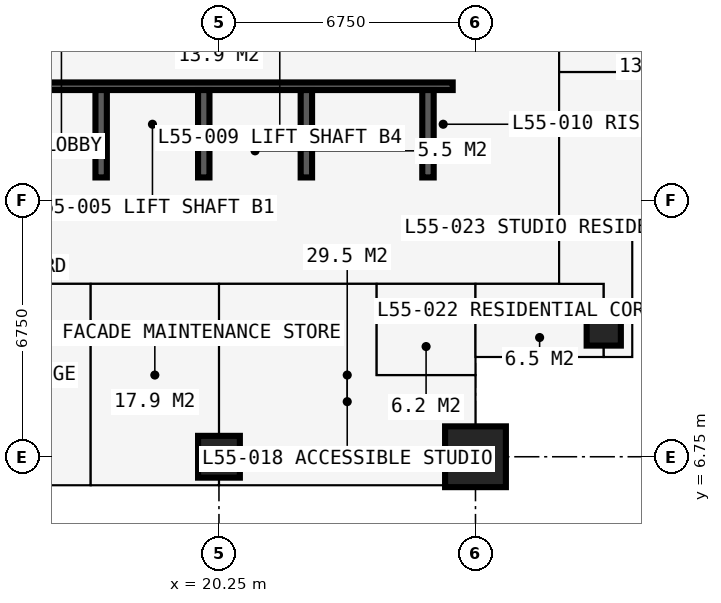
"""IFC4 building model, lengths in metres.
Left out: names, types, materials, properties, quantities, classifications, styles, units other than length and angle.
Written with IfcOpenShell. Run it as: python <this file> out.ifc"""

import sys

from ifc_helpers import new_model, si_unit, direction, frame, frame_2d, origin, origin_2d, place, context, subcontext, project, spatial, rectangle, extrude, element, fill, save


model = new_model("IFC4")
c1 = context("Model", 3, precision=1e-05, world=origin(), true_north=direction((0.0, 1.0)))
c2 = subcontext(c1, "Body", "Model", "MODEL_VIEW")
j1 = project(units=[si_unit("LENGTHUNIT", "METRE"), si_unit("PLANEANGLEUNIT", "RADIAN")], contexts=[c1])
p1 = place(None, origin())
s1 = spatial("IfcSite", under=j1, at=p1, CompositionType="ELEMENT")
p2 = place(p1, origin())
s2 = spatial("IfcBuilding", under=s1, at=p2, CompositionType="ELEMENT")
p3 = place(p2, frame((0.0, 0.0, 204.3)))
s3 = spatial("IfcBuildingStorey", under=s2, at=p3, CompositionType="ELEMENT", Elevation=204.3)
p4 = place(p3, frame((20.25, 6.75, 0.0), z_axis=(0.0, 0.0, 1.0), x_axis=(1.0, 0.0, 0.0)))
e1 = element("IfcColumn", 1, at=p4, inside=s3, PredefinedType="COLUMN", context=c2, shape_type="SweptSolid", body=[
    extrude(rectangle(XDim=1.1, YDim=1.1, at=origin_2d()), origin(), (0.0, 0.0, 1.0), 3.6),
])
p5 = place(p3, frame((27.0, 6.75, 0.0), z_axis=(0.0, 0.0, 1.0), x_axis=(1.0, 0.0, 0.0)))
e2 = element("IfcColumn", 2, at=p5, inside=s3, PredefinedType="COLUMN", context=c2, shape_type="SweptSolid", body=[
    extrude(rectangle(XDim=1.6, YDim=1.6, at=origin_2d()), origin(), (0.0, 0.0, 1.0), 3.6),
])
p6 = place(p3, frame((30.375, 10.125, 0.0), z_axis=(0.0, 0.0, 1.0), x_axis=(1.0, 0.0, 0.0)))
e3 = element("IfcColumn", 3, at=p6, inside=s3, PredefinedType="COLUMN", context=c2, shape_type="SweptSolid", body=[
    extrude(rectangle(XDim=0.9, YDim=0.9, at=origin_2d()), origin(), (0.0, 0.0, 1.0), 3.6),
])
p7 = place(p3, frame((13.2, 13.5, 0.0), z_axis=(0.0, 0.0, 1.0), x_axis=(1.0, 0.0, 0.0)))
e4 = element("IfcWall", 4, at=p7, inside=s3, PredefinedType="SHEAR", context=c2, shape_type="SweptSolid", body=[
    extrude(rectangle(XDim=14.1, YDim=1.2, at=frame_2d((7.05, 0.0))), origin(), (0.0, 0.0, 1.0), 3.6),
])
p8 = place(p3, frame((26.85, 14.1, 0.0), z_axis=(0.0, 0.0, 1.0), x_axis=(0.0, 1.0, 0.0)))
e5 = element("IfcWall", 5, at=p8, inside=s3, PredefinedType="SHEAR", context=c2, shape_type="SweptSolid", body=[
    extrude(rectangle(XDim=12.3, YDim=0.9, at=frame_2d((6.15, 0.0))), origin(), (0.0, 0.0, 1.0), 3.6),
])
p9 = place(p8, frame((3.65, 0.0, 0.0)))
e6 = element("IfcOpeningElement", 6, at=p9, cuts=e5, PredefinedType="OPENING", context=c2, shape_type="SweptSolid", body=[
    extrude(rectangle(XDim=1.2, YDim=2.2, at=frame_2d((0.6, 1.1))), frame((0.0, 0.46, 0.0), z_axis=(0.0, -1.0, 0.0), x_axis=(1.0, 0.0, 0.0)), (0.0, 0.0, 1.0), 0.92),
])
p10 = place(p3, frame((20.25, 6.0, 0.0), z_axis=(0.0, 0.0, 1.0), x_axis=(-1.0, 0.0, 0.0)))
e7 = element("IfcWall", 7, at=p10, inside=s3, PredefinedType="SOLIDWALL", context=c2, shape_type="SweptSolid", body=[
    extrude(rectangle(XDim=6.75, YDim=0.15, at=frame_2d((3.375, 0.0))), origin(), (0.0, 0.0, 1.0), 3.375),
])
p11 = place(p10, frame((0.363, 0.0, 0.0)))
e8 = element("IfcOpeningElement", 8, at=p11, cuts=e7, PredefinedType="OPENING", context=c2, shape_type="SweptSolid", body=[
    extrude(rectangle(XDim=1.0, YDim=2.2, at=frame_2d((0.5, 1.1))), frame((0.0, 0.085, 0.0), z_axis=(0.0, -1.0, 0.0), x_axis=(1.0, 0.0, 0.0)), (0.0, 0.0, 1.0), 0.17),
])
p12 = place(p10, frame((1.725, 0.0, 0.9)))
e9 = element("IfcOpeningElement", 9, at=p12, cuts=e7, PredefinedType="OPENING", context=c2, shape_type="SweptSolid", body=[
    extrude(rectangle(XDim=1.2, YDim=1.8, at=frame_2d((0.6, 0.9))), frame((0.0, 0.085, 0.0), z_axis=(0.0, -1.0, 0.0), x_axis=(1.0, 0.0, 0.0)), (0.0, 0.0, 1.0), 0.17),
])
p13 = place(p10, frame((4.854, 0.0, 0.0)))
e10 = element("IfcOpeningElement", 10, at=p13, cuts=e7, PredefinedType="OPENING", context=c2, shape_type="SweptSolid", body=[
    extrude(rectangle(XDim=1.0, YDim=2.2, at=frame_2d((0.5, 1.1))), frame((0.0, 0.085, 0.0), z_axis=(0.0, -1.0, 0.0), x_axis=(1.0, 0.0, 0.0)), (0.0, 0.0, 1.0), 0.17),
])
p14 = place(p10, frame((3.558, 0.0, 0.9)))
e11 = element("IfcOpeningElement", 11, at=p14, cuts=e7, PredefinedType="OPENING", context=c2, shape_type="SweptSolid", body=[
    extrude(rectangle(XDim=1.2, YDim=1.8, at=frame_2d((0.6, 0.9))), frame((0.0, 0.085, 0.0), z_axis=(0.0, -1.0, 0.0), x_axis=(1.0, 0.0, 0.0)), (0.0, 0.0, 1.0), 0.17),
])
p15 = place(p3, frame((27.75, 6.0, 0.0), z_axis=(0.0, 0.0, 1.0), x_axis=(0.0, 1.0, 0.0)))
e12 = element("IfcWall", 12, at=p15, inside=s3, PredefinedType="SOLIDWALL", context=c2, shape_type="SweptSolid", body=[
    extrude(rectangle(XDim=3.375, YDim=0.3, at=frame_2d((1.688, 0.0))), origin(), (0.0, 0.0, 1.0), 3.375),
])
p16 = place(p15, frame((1.633, 0.0, 0.9)))
e13 = element("IfcOpeningElement", 13, at=p16, cuts=e12, PredefinedType="OPENING", context=c2, shape_type="SweptSolid", body=[
    extrude(rectangle(XDim=1.5, YDim=1.8, at=frame_2d((0.75, 0.9))), frame((0.0, 0.16, 0.0), z_axis=(0.0, -1.0, 0.0), x_axis=(1.0, 0.0, 0.0)), (0.0, 0.0, 1.0), 0.32),
])
p17 = place(p3, frame((27.75, 9.375, 0.0), z_axis=(0.0, 0.0, 1.0), x_axis=(1.0, 0.0, 0.0)))
e14 = element("IfcWall", 14, at=p17, inside=s3, PredefinedType="SOLIDWALL", context=c2, shape_type="SweptSolid", body=[
    extrude(rectangle(XDim=3.375, YDim=0.3, at=frame_2d((1.688, 0.0))), origin(), (0.0, 0.0, 1.0), 3.375),
])
p18 = place(p17, frame((0.788, 0.0, 0.6)))
e15 = element("IfcOpeningElement", 15, at=p18, cuts=e14, PredefinedType="OPENING", context=c2, shape_type="SweptSolid", body=[
    extrude(rectangle(XDim=1.8, YDim=2.1, at=frame_2d((0.9, 1.05))), frame((0.0, 0.16, 0.0), z_axis=(0.0, -1.0, 0.0), x_axis=(1.0, 0.0, 0.0)), (0.0, 0.0, 1.0), 0.32),
])
p19 = place(p3, frame((31.125, 9.375, 0.0), z_axis=(0.0, 0.0, 1.0), x_axis=(0.0, 1.0, 0.0)))
e16 = element("IfcWall", 16, at=p19, inside=s3, PredefinedType="SOLIDWALL", context=c2, shape_type="SweptSolid", body=[
    extrude(rectangle(XDim=3.375, YDim=0.3, at=frame_2d((1.688, 0.0))), origin(), (0.0, 0.0, 1.0), 3.375),
])
p20 = place(p19, frame((0.788, 0.0, 0.6)))
e17 = element("IfcOpeningElement", 17, at=p20, cuts=e16, PredefinedType="OPENING", context=c2, shape_type="SweptSolid", body=[
    extrude(rectangle(XDim=1.8, YDim=2.1, at=frame_2d((0.9, 1.05))), frame((0.0, 0.16, 0.0), z_axis=(0.0, -1.0, 0.0), x_axis=(1.0, 0.0, 0.0)), (0.0, 0.0, 1.0), 0.32),
])
p21 = place(p3, frame((31.125, 12.75, 0.0), z_axis=(0.0, 0.0, 1.0), x_axis=(1.0, 0.0, 0.0)))
e18 = element("IfcWall", 18, at=p21, inside=s3, PredefinedType="SOLIDWALL", context=c2, shape_type="SweptSolid", body=[
    extrude(rectangle(XDim=3.375, YDim=0.3, at=frame_2d((1.688, 0.0))), origin(), (0.0, 0.0, 1.0), 3.375),
])
p22 = place(p21, frame((0.242, 0.0, 0.9)))
e19 = element("IfcOpeningElement", 19, at=p22, cuts=e18, PredefinedType="OPENING", context=c2, shape_type="SweptSolid", body=[
    extrude(rectangle(XDim=1.5, YDim=1.8, at=frame_2d((0.75, 0.9))), frame((0.0, 0.16, 0.0), z_axis=(0.0, -1.0, 0.0), x_axis=(1.0, 0.0, 0.0)), (0.0, 0.0, 1.0), 0.32),
])
p23 = place(p3, frame((14.1, 16.5, 0.0), z_axis=(0.0, 0.0, 1.0), x_axis=(1.0, 0.0, 0.0)))
e20 = element("IfcWall", 20, at=p23, inside=s3, PredefinedType="SHEAR", context=c2, shape_type="SweptSolid", body=[
    extrude(rectangle(XDim=12.3, YDim=0.2, at=frame_2d((6.15, 0.0))), origin(), (0.0, 0.0, 1.0), 3.6),
])
p24 = place(p23, frame((0.9, 0.0, 0.0)))
e21 = element("IfcOpeningElement", 21, at=p24, cuts=e20, PredefinedType="OPENING", context=c2, shape_type="SweptSolid", body=[
    extrude(rectangle(XDim=1.1, YDim=2.2, at=frame_2d((0.55, 1.1))), frame((0.0, 0.11, 0.0), z_axis=(0.0, -1.0, 0.0), x_axis=(1.0, 0.0, 0.0)), (0.0, 0.0, 1.0), 0.22),
])
p25 = place(p23, frame((4.31, 0.0, 0.0)))
e22 = element("IfcOpeningElement", 22, at=p25, cuts=e20, PredefinedType="OPENING", context=c2, shape_type="SweptSolid", body=[
    extrude(rectangle(XDim=1.1, YDim=2.2, at=frame_2d((0.55, 1.1))), frame((0.0, 0.11, 0.0), z_axis=(0.0, -1.0, 0.0), x_axis=(1.0, 0.0, 0.0)), (0.0, 0.0, 1.0), 0.22),
])
p26 = place(p23, frame((6.45, 0.0, 0.0)))
e23 = element("IfcOpeningElement", 23, at=p26, cuts=e20, PredefinedType="OPENING", context=c2, shape_type="SweptSolid", body=[
    extrude(rectangle(XDim=1.1, YDim=2.2, at=frame_2d((0.55, 1.1))), frame((0.0, 0.11, 0.0), z_axis=(0.0, -1.0, 0.0), x_axis=(1.0, 0.0, 0.0)), (0.0, 0.0, 1.0), 0.22),
])
p27 = place(p23, frame((9.5, 0.0, 0.0)))
e24 = element("IfcOpeningElement", 24, at=p27, cuts=e20, PredefinedType="OPENING", context=c2, shape_type="SweptSolid", body=[
    extrude(rectangle(XDim=1.1, YDim=2.2, at=frame_2d((0.55, 1.1))), frame((0.0, 0.11, 0.0), z_axis=(0.0, -1.0, 0.0), x_axis=(1.0, 0.0, 0.0)), (0.0, 0.0, 1.0), 0.22),
])
for number, where, z_axis, x_axis in (
    (25, (17.15, 14.1, 0.0), (0.0, 0.0, 1.0), (0.0, 1.0, 0.0)),
    (26, (19.85, 14.1, 0.0), (0.0, 0.0, 1.0), (0.0, 1.0, 0.0)),
    (27, (22.55, 14.1, 0.0), (0.0, 0.0, 1.0), (0.0, 1.0, 0.0)),
    (28, (25.75, 14.1, 0.0), (0.0, 0.0, 1.0), (0.0, 1.0, 0.0)),
):
    element("IfcWall", number, at=place(p3, frame(where, z_axis=z_axis, x_axis=x_axis)), inside=s3, PredefinedType="SHEAR", context=c2, shape_type="SweptSolid", body=[
        extrude(rectangle(XDim=2.3, YDim=0.3, at=frame_2d((1.15, 0.0))), origin(), (0.0, 0.0, 1.0), 3.6),
    ])
p28 = place(p3, frame((18.185, 16.6, 0.0), z_axis=(0.0, 0.0, 1.0), x_axis=(0.0, 1.0, 0.0)))
e29 = element("IfcWall", 29, at=p28, inside=s3, PredefinedType="PARTITIONING", context=c2, shape_type="SweptSolid", body=[
    extrude(rectangle(XDim=3.5, YDim=0.15, at=frame_2d((1.75, 0.0))), origin(), (0.0, 0.0, 1.0), 3.375),
])
p29 = place(p28, frame((1.15, 0.0, 0.0)))
e30 = element("IfcOpeningElement", 30, at=p29, cuts=e29, PredefinedType="OPENING", context=c2, shape_type="SweptSolid", body=[
    extrude(rectangle(XDim=1.2, YDim=2.2, at=frame_2d((0.6, 1.1))), frame((0.0, 0.085, 0.0), z_axis=(0.0, -1.0, 0.0), x_axis=(1.0, 0.0, 0.0)), (0.0, 0.0, 1.0), 0.17),
])
p30 = place(p3, frame((22.315, 16.6, 0.0), z_axis=(0.0, 0.0, 1.0), x_axis=(0.0, 1.0, 0.0)))
e31 = element("IfcWall", 31, at=p30, inside=s3, PredefinedType="PARTITIONING", context=c2, shape_type="SweptSolid", body=[
    extrude(rectangle(XDim=3.5, YDim=0.15, at=frame_2d((1.75, 0.0))), origin(), (0.0, 0.0, 1.0), 3.375),
])
p31 = place(p30, frame((1.15, 0.0, 0.0)))
e32 = element("IfcOpeningElement", 32, at=p31, cuts=e31, PredefinedType="OPENING", context=c2, shape_type="SweptSolid", body=[
    extrude(rectangle(XDim=1.2, YDim=2.2, at=frame_2d((0.6, 1.1))), frame((0.0, 0.085, 0.0), z_axis=(0.0, -1.0, 0.0), x_axis=(1.0, 0.0, 0.0)), (0.0, 0.0, 1.0), 0.17),
])
p32 = place(p3, frame((10.125, 11.3, 0.0), z_axis=(0.0, 0.0, 1.0), x_axis=(1.0, 0.0, 0.0)))
e33 = element("IfcWall", 33, at=p32, inside=s3, PredefinedType="PARTITIONING", context=c2, shape_type="SweptSolid", body=[
    extrude(rectangle(XDim=20.25, YDim=0.15, at=frame_2d((10.125, 0.0))), origin(), (0.0, 0.0, 1.0), 3.375),
])
p33 = place(p32, frame((11.725, 0.0, 0.0)))
e34 = element("IfcOpeningElement", 34, at=p33, cuts=e33, PredefinedType="OPENING", context=c2, shape_type="SweptSolid", body=[
    extrude(rectangle(XDim=0.95, YDim=2.2, at=frame_2d((0.475, 1.1))), frame((0.0, 0.085, 0.0), z_axis=(0.0, -1.0, 0.0), x_axis=(1.0, 0.0, 0.0)), (0.0, 0.0, 1.0), 0.17),
])
p34 = place(p32, frame((17.475, 0.0, 0.0)))
e35 = element("IfcOpeningElement", 35, at=p34, cuts=e33, PredefinedType="OPENING", context=c2, shape_type="SweptSolid", body=[
    extrude(rectangle(XDim=1.0, YDim=2.2, at=frame_2d((0.5, 1.1))), frame((0.0, 0.085, 0.0), z_axis=(0.0, -1.0, 0.0), x_axis=(1.0, 0.0, 0.0)), (0.0, 0.0, 1.0), 0.17),
])
p35 = place(p32, frame((7.95, 0.0, 0.0)))
e36 = element("IfcOpeningElement", 36, at=p35, cuts=e33, PredefinedType="OPENING", context=c2, shape_type="SweptSolid", body=[
    extrude(rectangle(XDim=0.95, YDim=2.2, at=frame_2d((0.475, 1.1))), frame((0.0, 0.085, 0.0), z_axis=(0.0, -1.0, 0.0), x_axis=(1.0, 0.0, 0.0)), (0.0, 0.0, 1.0), 0.17),
])
p36 = place(p3, frame((16.875, 6.016, 0.0), z_axis=(0.0, 0.0, 1.0), x_axis=(0.0, 1.0, 0.0)))
e37 = element("IfcWall", 37, at=p36, inside=s3, PredefinedType="PARTITIONING", context=c2, shape_type="SweptSolid", body=[
    extrude(rectangle(XDim=5.284, YDim=0.15, at=frame_2d((2.642, 0.0))), origin(), (0.0, 0.0, 1.0), 3.375),
])
p37 = place(p3, frame((20.25, 6.016, 0.0), z_axis=(0.0, 0.0, 1.0), x_axis=(0.0, 1.0, 0.0)))
e38 = element("IfcWall", 38, at=p37, inside=s3, PredefinedType="PARTITIONING", context=c2, shape_type="SweptSolid", body=[
    extrude(rectangle(XDim=5.284, YDim=0.15, at=frame_2d((2.642, 0.0))), origin(), (0.0, 0.0, 1.0), 2.806),
])
p38 = place(p3, frame((24.4, 8.9, 0.0), z_axis=(0.0, 0.0, 1.0), x_axis=(0.0, 1.0, 0.0)))
e39 = element("IfcWall", 39, at=p38, inside=s3, PredefinedType="PARTITIONING", context=c2, shape_type="SweptSolid", body=[
    extrude(rectangle(XDim=2.4, YDim=0.1, at=frame_2d((1.2, 0.0))), origin(), (0.0, 0.0, 1.0), 3.375),
])
p39 = place(p3, frame((24.4, 8.9, 0.0), z_axis=(0.0, 0.0, 1.0), x_axis=(1.0, 0.0, 0.0)))
e40 = element("IfcWall", 40, at=p39, inside=s3, PredefinedType="PARTITIONING", context=c2, shape_type="SweptSolid", body=[
    extrude(rectangle(XDim=2.6, YDim=0.1, at=frame_2d((1.3, 0.0))), origin(), (0.0, 0.0, 1.0), 3.375),
])
p40 = place(p39, frame((0.85, 0.0, 0.0)))
e41 = element("IfcOpeningElement", 41, at=p40, cuts=e40, PredefinedType="OPENING", context=c2, shape_type="SweptSolid", body=[
    extrude(rectangle(XDim=0.9, YDim=2.2, at=frame_2d((0.45, 1.1))), frame((0.0, 0.06, 0.0), z_axis=(0.0, -1.0, 0.0), x_axis=(1.0, 0.0, 0.0)), (0.0, 0.0, 1.0), 0.12),
])
p41 = place(p3, frame((27.0, 6.016, 0.0), z_axis=(0.0, 0.0, 1.0), x_axis=(0.0, 1.0, 0.0)))
e42 = element("IfcWall", 42, at=p41, inside=s3, PredefinedType="PARTITIONING", context=c2, shape_type="SweptSolid", body=[
    extrude(rectangle(XDim=5.284, YDim=0.175, at=frame_2d((2.642, 0.0))), origin(), (0.0, 0.0, 1.0), 2.806),
])
p42 = place(p3, frame((27.0, 9.375, 0.0), z_axis=(0.0, 0.0, 1.0), x_axis=(1.0, 0.0, 0.0)))
e43 = element("IfcWall", 43, at=p42, inside=s3, PredefinedType="PARTITIONING", context=c2, shape_type="SweptSolid", body=[
    extrude(rectangle(XDim=0.734, YDim=0.15, at=frame_2d((0.367, 0.0))), origin(), (0.0, 0.0, 1.0), 3.375),
])
p43 = place(p3, frame((29.2, 11.3, 0.0), z_axis=(0.0, 0.0, 1.0), x_axis=(0.0, 1.0, 0.0)))
e44 = element("IfcWall", 44, at=p43, inside=s3, PredefinedType="PARTITIONING", context=c2, shape_type="SweptSolid", body=[
    extrude(rectangle(XDim=17.9, YDim=0.2, at=frame_2d((8.95, 0.0))), origin(), (0.0, 0.0, 1.0), 3.375),
])
p44 = place(p43, frame((2.3, 0.0, 0.0)))
e45 = element("IfcOpeningElement", 45, at=p44, cuts=e44, PredefinedType="OPENING", context=c2, shape_type="SweptSolid", body=[
    extrude(rectangle(XDim=1.0, YDim=2.2, at=frame_2d((0.5, 1.1))), frame((0.0, 0.11, 0.0), z_axis=(0.0, -1.0, 0.0), x_axis=(1.0, 0.0, 0.0)), (0.0, 0.0, 1.0), 0.22),
])
p45 = place(p43, frame((10.55, 0.0, 0.0)))
e46 = element("IfcOpeningElement", 46, at=p45, cuts=e44, PredefinedType="OPENING", context=c2, shape_type="SweptSolid", body=[
    extrude(rectangle(XDim=0.95, YDim=2.2, at=frame_2d((0.475, 1.1))), frame((0.0, 0.11, 0.0), z_axis=(0.0, -1.0, 0.0), x_axis=(1.0, 0.0, 0.0)), (0.0, 0.0, 1.0), 0.22),
])
p46 = place(p43, frame((5.775, 0.0, 0.0)))
e47 = element("IfcOpeningElement", 47, at=p46, cuts=e44, PredefinedType="OPENING", context=c2, shape_type="SweptSolid", body=[
    extrude(rectangle(XDim=0.95, YDim=2.2, at=frame_2d((0.475, 1.1))), frame((0.0, 0.11, 0.0), z_axis=(0.0, -1.0, 0.0), x_axis=(1.0, 0.0, 0.0)), (0.0, 0.0, 1.0), 0.22),
])
p47 = place(p43, frame((16.3, 0.0, 0.0)))
e48 = element("IfcOpeningElement", 48, at=p47, cuts=e44, PredefinedType="OPENING", context=c2, shape_type="SweptSolid", body=[
    extrude(rectangle(XDim=1.0, YDim=2.2, at=frame_2d((0.5, 1.1))), frame((0.0, 0.11, 0.0), z_axis=(0.0, -1.0, 0.0), x_axis=(1.0, 0.0, 0.0)), (0.0, 0.0, 1.0), 0.22),
])
p48 = place(p3, frame((29.2, 16.875, 0.0), z_axis=(0.0, 0.0, 1.0), x_axis=(1.0, 0.0, 0.0)))
e49 = element("IfcWall", 49, at=p48, inside=s3, PredefinedType="PARTITIONING", context=c2, shape_type="SweptSolid", body=[
    extrude(rectangle(XDim=5.284, YDim=0.15, at=frame_2d((2.642, 0.0))), origin(), (0.0, 0.0, 1.0), 3.375),
])
p49 = place(p3, frame((30.375, 9.525, 0.0), z_axis=(0.0, 0.0, 1.0), x_axis=(0.0, 1.0, 0.0)))
e50 = element("IfcWall", 50, at=p49, inside=s3, PredefinedType="PARTITIONING", context=c2, shape_type="SweptSolid", body=[
    extrude(rectangle(XDim=1.775, YDim=0.15, at=frame_2d((0.888, 0.0))), origin(), (0.0, 0.0, 1.0), 2.877),
])
p50 = place(p11, origin())
e51 = element("IfcDoor", 51, at=p50, inside=s3, OperationType="SINGLE_SWING_LEFT", PredefinedType="DOOR", context=c2, shape_type="SweptSolid", body=[
    extrude(rectangle(XDim=1.0, YDim=2.2, at=frame_2d((0.5, 1.1))), frame((0.0, 0.025, 0.0), z_axis=(0.0, -1.0, 0.0), x_axis=(1.0, 0.0, 0.0)), (0.0, 0.0, 1.0), 0.05),
])
fill(e8, e51)
p51 = place(p12, origin())
e52 = element("IfcWindow", 52, at=p51, inside=s3, PartitioningType="SINGLE_PANEL", PredefinedType="WINDOW", context=c2, shape_type="SweptSolid", body=[
    extrude(rectangle(XDim=1.2, YDim=1.8, at=frame_2d((0.6, 0.9))), frame((0.0, 0.03, 0.0), z_axis=(0.0, -1.0, 0.0), x_axis=(1.0, 0.0, 0.0)), (0.0, 0.0, 1.0), 0.06),
])
fill(e9, e52)
p52 = place(p14, origin())
e53 = element("IfcWindow", 53, at=p52, inside=s3, PartitioningType="SINGLE_PANEL", PredefinedType="WINDOW", context=c2, shape_type="SweptSolid", body=[
    extrude(rectangle(XDim=1.2, YDim=1.8, at=frame_2d((0.6, 0.9))), frame((0.0, 0.03, 0.0), z_axis=(0.0, -1.0, 0.0), x_axis=(1.0, 0.0, 0.0)), (0.0, 0.0, 1.0), 0.06),
])
fill(e11, e53)
p53 = place(p16, origin())
e54 = element("IfcWindow", 54, at=p53, inside=s3, PartitioningType="SINGLE_PANEL", PredefinedType="WINDOW", context=c2, shape_type="SweptSolid", body=[
    extrude(rectangle(XDim=1.5, YDim=1.8, at=frame_2d((0.75, 0.9))), frame((0.0, 0.03, 0.0), z_axis=(0.0, -1.0, 0.0), x_axis=(1.0, 0.0, 0.0)), (0.0, 0.0, 1.0), 0.06),
])
fill(e13, e54)
p54 = place(p18, origin())
e55 = element("IfcWindow", 55, at=p54, inside=s3, PartitioningType="SINGLE_PANEL", PredefinedType="WINDOW", context=c2, shape_type="SweptSolid", body=[
    extrude(rectangle(XDim=1.8, YDim=2.1, at=frame_2d((0.9, 1.05))), frame((0.0, 0.03, 0.0), z_axis=(0.0, -1.0, 0.0), x_axis=(1.0, 0.0, 0.0)), (0.0, 0.0, 1.0), 0.06),
])
fill(e15, e55)
p55 = place(p20, origin())
e56 = element("IfcWindow", 56, at=p55, inside=s3, PartitioningType="SINGLE_PANEL", PredefinedType="WINDOW", context=c2, shape_type="SweptSolid", body=[
    extrude(rectangle(XDim=1.8, YDim=2.1, at=frame_2d((0.9, 1.05))), frame((0.0, 0.03, 0.0), z_axis=(0.0, -1.0, 0.0), x_axis=(1.0, 0.0, 0.0)), (0.0, 0.0, 1.0), 0.06),
])
fill(e17, e56)
p56 = place(p22, origin())
e57 = element("IfcWindow", 57, at=p56, inside=s3, PartitioningType="SINGLE_PANEL", PredefinedType="WINDOW", context=c2, shape_type="SweptSolid", body=[
    extrude(rectangle(XDim=1.5, YDim=1.8, at=frame_2d((0.75, 0.9))), frame((0.0, 0.03, 0.0), z_axis=(0.0, -1.0, 0.0), x_axis=(1.0, 0.0, 0.0)), (0.0, 0.0, 1.0), 0.06),
])
fill(e19, e57)
p57 = place(p24, origin())
e58 = element("IfcDoor", 58, at=p57, inside=s3, OperationType="DOUBLE_DOOR_SLIDING", PredefinedType="DOOR", context=c2, shape_type="SweptSolid", body=[
    extrude(rectangle(XDim=1.1, YDim=2.2, at=frame_2d((0.55, 1.1))), frame((0.0, 0.025, 0.0), z_axis=(0.0, -1.0, 0.0), x_axis=(1.0, 0.0, 0.0)), (0.0, 0.0, 1.0), 0.05),
])
fill(e21, e58)
p58 = place(p25, origin())
e59 = element("IfcDoor", 59, at=p58, inside=s3, OperationType="DOUBLE_DOOR_SLIDING", PredefinedType="DOOR", context=c2, shape_type="SweptSolid", body=[
    extrude(rectangle(XDim=1.1, YDim=2.2, at=frame_2d((0.55, 1.1))), frame((0.0, 0.025, 0.0), z_axis=(0.0, -1.0, 0.0), x_axis=(1.0, 0.0, 0.0)), (0.0, 0.0, 1.0), 0.05),
])
fill(e22, e59)
p59 = place(p26, origin())
e60 = element("IfcDoor", 60, at=p59, inside=s3, OperationType="DOUBLE_DOOR_SLIDING", PredefinedType="DOOR", context=c2, shape_type="SweptSolid", body=[
    extrude(rectangle(XDim=1.1, YDim=2.2, at=frame_2d((0.55, 1.1))), frame((0.0, 0.025, 0.0), z_axis=(0.0, -1.0, 0.0), x_axis=(1.0, 0.0, 0.0)), (0.0, 0.0, 1.0), 0.05),
])
fill(e23, e60)
p60 = place(p27, origin())
e61 = element("IfcDoor", 61, at=p60, inside=s3, OperationType="DOUBLE_DOOR_SLIDING", PredefinedType="DOOR", context=c2, shape_type="SweptSolid", body=[
    extrude(rectangle(XDim=1.1, YDim=2.2, at=frame_2d((0.55, 1.1))), frame((0.0, 0.025, 0.0), z_axis=(0.0, -1.0, 0.0), x_axis=(1.0, 0.0, 0.0)), (0.0, 0.0, 1.0), 0.05),
])
fill(e24, e61)
p61 = place(p33, origin())
e62 = element("IfcDoor", 62, at=p61, inside=s3, OperationType="SINGLE_SWING_LEFT", PredefinedType="DOOR", context=c2, shape_type="SweptSolid", body=[
    extrude(rectangle(XDim=0.95, YDim=2.2, at=frame_2d((0.475, 1.1))), frame((0.0, 0.025, 0.0), z_axis=(0.0, -1.0, 0.0), x_axis=(1.0, 0.0, 0.0)), (0.0, 0.0, 1.0), 0.05),
])
fill(e34, e62)
p62 = place(p40, origin())
e63 = element("IfcDoor", 63, at=p62, inside=s3, OperationType="SINGLE_SWING_RIGHT", PredefinedType="DOOR", context=c2, shape_type="SweptSolid", body=[
    extrude(rectangle(XDim=0.9, YDim=2.2, at=frame_2d((0.45, 1.1))), frame((0.0, 0.025, 0.0), z_axis=(0.0, -1.0, 0.0), x_axis=(1.0, 0.0, 0.0)), (0.0, 0.0, 1.0), 0.05),
])
fill(e41, e63)
p63 = place(p34, origin())
e64 = element("IfcDoor", 64, at=p63, inside=s3, OperationType="SINGLE_SWING_LEFT", PredefinedType="DOOR", context=c2, shape_type="SweptSolid", body=[
    extrude(rectangle(XDim=1.0, YDim=2.2, at=frame_2d((0.5, 1.1))), frame((0.0, 0.025, 0.0), z_axis=(0.0, -1.0, 0.0), x_axis=(1.0, 0.0, 0.0)), (0.0, 0.0, 1.0), 0.05),
])
fill(e35, e64)
p64 = place(p44, origin())
e65 = element("IfcDoor", 65, at=p64, inside=s3, OperationType="SINGLE_SWING_LEFT", PredefinedType="DOOR", context=c2, shape_type="SweptSolid", body=[
    extrude(rectangle(XDim=1.0, YDim=2.2, at=frame_2d((0.5, 1.1))), frame((0.0, 0.025, 0.0), z_axis=(0.0, -1.0, 0.0), x_axis=(1.0, 0.0, 0.0)), (0.0, 0.0, 1.0), 0.05),
])
fill(e45, e65)
p65 = place(p46, origin())
e66 = element("IfcDoor", 66, at=p65, inside=s3, OperationType="SINGLE_SWING_LEFT", PredefinedType="DOOR", context=c2, shape_type="SweptSolid", body=[
    extrude(rectangle(XDim=0.95, YDim=2.2, at=frame_2d((0.475, 1.1))), frame((0.0, 0.025, 0.0), z_axis=(0.0, -1.0, 0.0), x_axis=(1.0, 0.0, 0.0)), (0.0, 0.0, 1.0), 0.05),
])
fill(e47, e66)
p66 = place(p35, origin())
e67 = element("IfcDoor", 67, at=p66, inside=s3, OperationType="SINGLE_SWING_LEFT", PredefinedType="DOOR", context=c2, shape_type="SweptSolid", body=[
    extrude(rectangle(XDim=0.95, YDim=2.2, at=frame_2d((0.475, 1.1))), frame((0.0, 0.025, 0.0), z_axis=(0.0, -1.0, 0.0), x_axis=(1.0, 0.0, 0.0)), (0.0, 0.0, 1.0), 0.05),
])
fill(e36, e67)
save(model, sys.argv[1])
